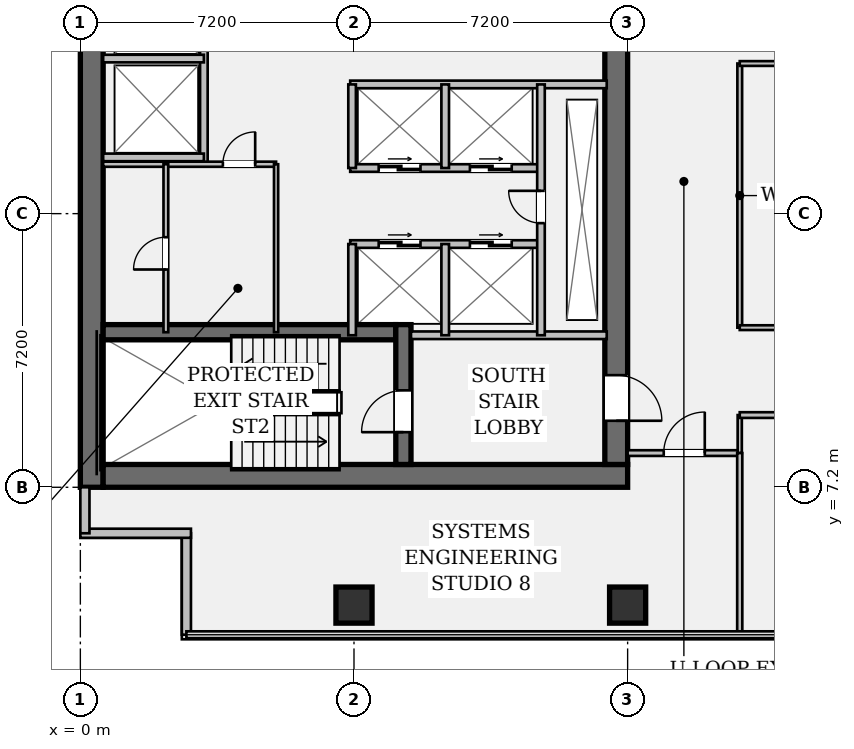
"""IFC4 building model, lengths in metres.
Left out: names, types, materials, properties, quantities, classifications, styles, units other than length and angle.
Written with IfcOpenShell. Run it as: python <this file> out.ifc"""

import sys

from ifc_helpers import new_model, si_unit, direction, frame, frame_2d, origin, origin_2d, place, context, subcontext, project, spatial, rectangle, hollow_rectangle, extrude, element, fill, save


model = new_model("IFC4")
c1 = context("Model", 3, precision=1e-05, world=origin(), true_north=direction((0.0, 1.0)))
c2 = subcontext(c1, "Body", "Model", "MODEL_VIEW")
j1 = project(units=[si_unit("LENGTHUNIT", "METRE"), si_unit("PLANEANGLEUNIT", "RADIAN")], contexts=[c1])
p1 = place(None, origin())
s1 = spatial("IfcSite", under=j1, at=p1, CompositionType="ELEMENT")
p2 = place(p1, origin())
s2 = spatial("IfcBuilding", under=s1, at=p2, CompositionType="ELEMENT")
p3 = place(p2, frame((0.0, 0.0, 102.2)))
s3 = spatial("IfcBuildingStorey", under=s2, at=p3, CompositionType="ELEMENT", Elevation=102.2)
p4 = place(p3, frame((0.3, 7.2, 0.0), z_axis=(0.0, 0.0, 1.0), x_axis=(0.0, 1.0, 0.0)))
e1 = element("IfcWall", 1, at=p4, inside=s3, PredefinedType="SHEAR", context=c2, shape_type="SweptSolid", body=[
    extrude(rectangle(XDim=28.8, YDim=0.6, at=frame_2d((14.4, 0.0))), origin(), (0.0, 0.0, 1.0), 3.58),
])
p5 = place(p3, frame((0.6, 7.5, 0.0), z_axis=(0.0, 0.0, 1.0), x_axis=(1.0, 0.0, 0.0)))
e2 = element("IfcWall", 2, at=p5, inside=s3, PredefinedType="SHEAR", context=c2, shape_type="SweptSolid", body=[
    extrude(rectangle(XDim=13.8, YDim=0.6, at=frame_2d((6.9, 0.0))), origin(), (0.0, 0.0, 1.0), 3.58),
])
p6 = place(p3, frame((14.1, 35.4, 0.0), z_axis=(0.0, 0.0, 1.0), x_axis=(0.0, -1.0, 0.0)))
e3 = element("IfcWall", 3, at=p6, inside=s3, PredefinedType="SHEAR", context=c2, shape_type="SweptSolid", body=[
    extrude(rectangle(XDim=27.6, YDim=0.6, at=frame_2d((13.8, 0.0))), origin(), (0.0, 0.0, 1.0), 3.58),
])
p7 = place(p6, frame((1.3, 0.0, 0.0)))
e4 = element("IfcOpeningElement", 4, at=p7, cuts=e3, PredefinedType="OPENING", context=c2, shape_type="SweptSolid", body=[
    extrude(rectangle(XDim=1.2, YDim=2.15, at=frame_2d((0.6, 1.075))), frame((0.0, 0.312, 0.0), z_axis=(0.0, -1.0, 0.0), x_axis=(1.0, 0.0, 0.0)), (0.0, 0.0, 1.0), 0.624),
])
p8 = place(p6, frame((25.25, 0.0, 0.0)))
e5 = element("IfcOpeningElement", 5, at=p8, cuts=e3, PredefinedType="OPENING", context=c2, shape_type="SweptSolid", body=[
    extrude(rectangle(XDim=1.2, YDim=2.15, at=frame_2d((0.6, 1.075))), frame((0.0, 0.312, 0.0), z_axis=(0.0, -1.0, 0.0), x_axis=(1.0, 0.0, 0.0)), (0.0, 0.0, 1.0), 0.624),
])
p9 = place(p6, frame((14.6, 0.0, 0.0)))
e6 = element("IfcOpeningElement", 6, at=p9, cuts=e3, PredefinedType="OPENING", context=c2, shape_type="SweptSolid", body=[
    extrude(rectangle(XDim=1.6, YDim=2.2, at=frame_2d((0.8, 1.1))), frame((0.0, 0.312, 0.0), z_axis=(0.0, -1.0, 0.0), x_axis=(1.0, 0.0, 0.0)), (0.0, 0.0, 1.0), 0.624),
])
p10 = place(p3, frame((0.6, 11.28, 0.0), z_axis=(0.0, 0.0, 1.0), x_axis=(1.0, 0.0, 0.0)))
e7 = element("IfcWall", 7, at=p10, inside=s3, PredefinedType="SHEAR", context=c2, shape_type="SweptSolid", body=[
    extrude(rectangle(XDim=7.7, YDim=0.4, at=frame_2d((3.85, 0.0))), origin(), (0.0, 0.0, 1.0), 3.58),
])
p11 = place(p3, frame((8.5, 7.8, 0.0), z_axis=(0.0, 0.0, 1.0), x_axis=(0.0, 1.0, 0.0)))
e8 = element("IfcWall", 8, at=p11, inside=s3, PredefinedType="SHEAR", context=c2, shape_type="SweptSolid", body=[
    extrude(rectangle(XDim=3.68, YDim=0.4, at=frame_2d((1.84, 0.0))), origin(), (0.0, 0.0, 1.0), 3.58),
])
p12 = place(p11, frame((0.85, 0.0, 0.0)))
e9 = element("IfcOpeningElement", 9, at=p12, cuts=e8, PredefinedType="OPENING", context=c2, shape_type="SweptSolid", body=[
    extrude(rectangle(XDim=1.1, YDim=2.15, at=frame_2d((0.55, 1.075))), frame((0.0, 0.212, 0.0), z_axis=(0.0, -1.0, 0.0), x_axis=(1.0, 0.0, 0.0)), (0.0, 0.0, 1.0), 0.424),
])
for number, where, z_axis, x_axis in (
    (10, (7.2, 4.1, 0.0), (0.0, 0.0, 1.0), (1.0, 0.0, 0.0)),
    (11, (14.4, 4.1, 0.0), (0.0, 0.0, 1.0), (1.0, 0.0, 0.0)),
):
    element("IfcColumn", number, at=place(p3, frame(where, z_axis=z_axis, x_axis=x_axis)), inside=s3, PredefinedType="COLUMN", context=c2, shape_type="SweptSolid", body=[
        extrude(hollow_rectangle(XDim=0.95, YDim=0.95, WallThickness=0.06, at=origin_2d()), origin(), (0.0, 0.0, 1.0), 3.58),
    ])
p13 = place(p3, frame((2.79, 3.32, 0.0), z_axis=(0.0, 0.0, 1.0), x_axis=(0.0, 1.0, 0.0)))
e12 = element("IfcWall", 12, at=p13, inside=s3, PredefinedType="STANDARD", context=c2, shape_type="SweptSolid", body=[
    extrude(rectangle(XDim=2.67, YDim=0.24, at=frame_2d((1.335, 0.0))), origin(), (0.0, 0.0, 1.0), 3.58),
])
p14 = place(p3, frame((2.91, 5.99, 0.0), z_axis=(0.0, 0.0, 1.0), x_axis=(-1.0, 0.0, 0.0)))
e13 = element("IfcWall", 13, at=p14, inside=s3, PredefinedType="STANDARD", context=c2, shape_type="SweptSolid", body=[
    extrude(rectangle(XDim=2.91, YDim=0.24, at=frame_2d((1.455, 0.0))), origin(), (0.0, 0.0, 1.0), 3.58),
])
p15 = place(p3, frame((0.12, 5.99, 0.0), z_axis=(0.0, 0.0, 1.0), x_axis=(0.0, 1.0, 0.0)))
e14 = element("IfcWall", 14, at=p15, inside=s3, PredefinedType="STANDARD", context=c2, shape_type="SweptSolid", body=[
    extrude(rectangle(XDim=1.21, YDim=0.24, at=frame_2d((0.605, 0.0))), origin(), (0.0, 0.0, 1.0), 3.58),
])
p16 = place(p3, frame((8.7, 11.2, 0.0), z_axis=(0.0, 0.0, 1.0), x_axis=(1.0, 0.0, 0.0)))
e15 = element("IfcWall", 15, at=p16, inside=s3, PredefinedType="PARTITIONING", context=c2, shape_type="SweptSolid", body=[
    extrude(rectangle(XDim=5.15, YDim=0.2, at=frame_2d((2.575, 0.0))), origin(), (0.0, 0.0, 1.0), 3.58),
])
p17 = place(p3, frame((3.25, 15.7, 0.0), z_axis=(0.0, 0.0, 1.0), x_axis=(0.0, 1.0, 0.0)))
e16 = element("IfcWall", 16, at=p17, inside=s3, PredefinedType="PARTITIONING", context=c2, shape_type="SweptSolid", body=[
    extrude(rectangle(XDim=13.08, YDim=0.2, at=frame_2d((6.54, 0.0))), origin(), (0.0, 0.0, 1.0), 3.58),
])
for number, where, z_axis, x_axis in (
    (17, (0.6, 15.88, 0.0), (0.0, 0.0, 1.0), (1.0, 0.0, 0.0)),
    (18, (0.6, 18.48, 0.0), (0.0, 0.0, 1.0), (1.0, 0.0, 0.0)),
):
    element("IfcWall", number, at=place(p3, frame(where, z_axis=z_axis, x_axis=x_axis)), inside=s3, PredefinedType="PARTITIONING", context=c2, shape_type="SweptSolid", body=[
        extrude(rectangle(XDim=2.65, YDim=0.2, at=frame_2d((1.325, 0.0))), origin(), (0.0, 0.0, 1.0), 3.58),
    ])
p18 = place(p3, frame((7.1, 17.8, 0.0), z_axis=(0.0, 0.0, 1.0), x_axis=(1.0, 0.0, 0.0)))
e19 = element("IfcWall", 19, at=p18, inside=s3, PredefinedType="PARTITIONING", context=c2, shape_type="SweptSolid", body=[
    extrude(rectangle(XDim=6.75, YDim=0.2, at=frame_2d((3.375, 0.0))), origin(), (0.0, 0.0, 1.0), 3.58),
])
p19 = place(p3, frame((7.1, 15.6, 0.0), z_axis=(0.0, 0.0, 1.0), x_axis=(1.0, 0.0, 0.0)))
e20 = element("IfcWall", 20, at=p19, inside=s3, PredefinedType="PARTITIONING", context=c2, shape_type="SweptSolid", body=[
    extrude(rectangle(XDim=5.02, YDim=0.2, at=frame_2d((2.51, 0.0))), origin(), (0.0, 0.0, 1.0), 3.58),
])
p20 = place(p19, frame((0.75, 0.0, 0.0)))
e21 = element("IfcOpeningElement", 21, at=p20, cuts=e20, PredefinedType="OPENING", context=c2, shape_type="SweptSolid", body=[
    extrude(rectangle(XDim=1.1, YDim=2.2, at=frame_2d((0.55, 1.1))), frame((0.0, 0.112, 0.0), z_axis=(0.0, -1.0, 0.0), x_axis=(1.0, 0.0, 0.0)), (0.0, 0.0, 1.0), 0.224),
])
p21 = place(p19, frame((3.15, 0.0, 0.0)))
e22 = element("IfcOpeningElement", 22, at=p21, cuts=e20, PredefinedType="OPENING", context=c2, shape_type="SweptSolid", body=[
    extrude(rectangle(XDim=1.1, YDim=2.2, at=frame_2d((0.55, 1.1))), frame((0.0, 0.112, 0.0), z_axis=(0.0, -1.0, 0.0), x_axis=(1.0, 0.0, 0.0)), (0.0, 0.0, 1.0), 0.224),
])
p22 = place(p3, frame((7.1, 13.6, 0.0), z_axis=(0.0, 0.0, 1.0), x_axis=(1.0, 0.0, 0.0)))
e23 = element("IfcWall", 23, at=p22, inside=s3, PredefinedType="PARTITIONING", context=c2, shape_type="SweptSolid", body=[
    extrude(rectangle(XDim=5.02, YDim=0.2, at=frame_2d((2.51, 0.0))), origin(), (0.0, 0.0, 1.0), 3.58),
])
p23 = place(p22, frame((0.75, 0.0, 0.0)))
e24 = element("IfcOpeningElement", 24, at=p23, cuts=e23, PredefinedType="OPENING", context=c2, shape_type="SweptSolid", body=[
    extrude(rectangle(XDim=1.1, YDim=2.2, at=frame_2d((0.55, 1.1))), frame((0.0, 0.112, 0.0), z_axis=(0.0, -1.0, 0.0), x_axis=(1.0, 0.0, 0.0)), (0.0, 0.0, 1.0), 0.224),
])
p24 = place(p22, frame((3.15, 0.0, 0.0)))
e25 = element("IfcOpeningElement", 25, at=p24, cuts=e23, PredefinedType="OPENING", context=c2, shape_type="SweptSolid", body=[
    extrude(rectangle(XDim=1.1, YDim=2.2, at=frame_2d((0.55, 1.1))), frame((0.0, 0.112, 0.0), z_axis=(0.0, -1.0, 0.0), x_axis=(1.0, 0.0, 0.0)), (0.0, 0.0, 1.0), 0.224),
])
p25 = place(p3, frame((7.15, 15.6, 0.0), z_axis=(0.0, 0.0, 1.0), x_axis=(0.0, 1.0, 0.0)))
e26 = element("IfcWall", 26, at=p25, inside=s3, PredefinedType="PARTITIONING", context=c2, shape_type="SweptSolid", body=[
    extrude(rectangle(XDim=2.2, YDim=0.2, at=frame_2d((1.1, 0.0))), origin(), (0.0, 0.0, 1.0), 3.58),
])
p26 = place(p3, frame((7.15, 11.2, 0.0), z_axis=(0.0, 0.0, 1.0), x_axis=(0.0, 1.0, 0.0)))
e27 = element("IfcWall", 27, at=p26, inside=s3, PredefinedType="PARTITIONING", context=c2, shape_type="SweptSolid", body=[
    extrude(rectangle(XDim=2.4, YDim=0.2, at=frame_2d((1.2, 0.0))), origin(), (0.0, 0.0, 1.0), 3.58),
])
p27 = place(p3, frame((9.6, 15.6, 0.0), z_axis=(0.0, 0.0, 1.0), x_axis=(0.0, 1.0, 0.0)))
e28 = element("IfcWall", 28, at=p27, inside=s3, PredefinedType="PARTITIONING", context=c2, shape_type="SweptSolid", body=[
    extrude(rectangle(XDim=2.2, YDim=0.2, at=frame_2d((1.1, 0.0))), origin(), (0.0, 0.0, 1.0), 3.58),
])
p28 = place(p3, frame((9.6, 11.2, 0.0), z_axis=(0.0, 0.0, 1.0), x_axis=(0.0, 1.0, 0.0)))
e29 = element("IfcWall", 29, at=p28, inside=s3, PredefinedType="PARTITIONING", context=c2, shape_type="SweptSolid", body=[
    extrude(rectangle(XDim=2.4, YDim=0.2, at=frame_2d((1.2, 0.0))), origin(), (0.0, 0.0, 1.0), 3.58),
])
p29 = place(p3, frame((12.12, 11.2, 0.0), z_axis=(0.0, 0.0, 1.0), x_axis=(0.0, 1.0, 0.0)))
e30 = element("IfcWall", 30, at=p29, inside=s3, PredefinedType="PARTITIONING", context=c2, shape_type="SweptSolid", body=[
    extrude(rectangle(XDim=6.6, YDim=0.2, at=frame_2d((3.3, 0.0))), origin(), (0.0, 0.0, 1.0), 3.58),
])
p30 = place(p29, frame((2.95, 0.0, 0.0)))
e31 = element("IfcOpeningElement", 31, at=p30, cuts=e30, PredefinedType="OPENING", context=c2, shape_type="SweptSolid", body=[
    extrude(rectangle(XDim=0.85, YDim=2.15, at=frame_2d((0.425, 1.075))), frame((0.0, 0.112, 0.0), z_axis=(0.0, -1.0, 0.0), x_axis=(1.0, 0.0, 0.0)), (0.0, 0.0, 1.0), 0.224),
])
p31 = place(p3, frame((0.6, 15.7, 0.0), z_axis=(0.0, 0.0, 1.0), x_axis=(1.0, 0.0, 0.0)))
e32 = element("IfcWall", 32, at=p31, inside=s3, PredefinedType="PARTITIONING", context=c2, shape_type="SweptSolid", body=[
    extrude(rectangle(XDim=4.55, YDim=0.135, at=frame_2d((2.275, 0.0))), origin(), (0.0, 0.0, 1.0), 3.58),
])
p32 = place(p31, frame((3.15, 0.0, 0.0)))
e33 = element("IfcOpeningElement", 33, at=p32, cuts=e32, PredefinedType="OPENING", context=c2, shape_type="SweptSolid", body=[
    extrude(rectangle(XDim=0.85, YDim=2.15, at=frame_2d((0.425, 1.075))), frame((0.0, 0.08, 0.0), z_axis=(0.0, -1.0, 0.0), x_axis=(1.0, 0.0, 0.0)), (0.0, 0.0, 1.0), 0.159),
])
p33 = place(p3, frame((5.15, 11.28, 0.0), z_axis=(0.0, 0.0, 1.0), x_axis=(0.0, 1.0, 0.0)))
e34 = element("IfcWall", 34, at=p33, inside=s3, PredefinedType="PARTITIONING", context=c2, shape_type="SweptSolid", body=[
    extrude(rectangle(XDim=4.42, YDim=0.11, at=frame_2d((2.21, 0.0))), origin(), (0.0, 0.0, 1.0), 3.58),
])
p34 = place(p3, frame((2.25, 11.28, 0.0), z_axis=(0.0, 0.0, 1.0), x_axis=(0.0, 1.0, 0.0)))
e35 = element("IfcWall", 35, at=p34, inside=s3, PredefinedType="PARTITIONING", context=c2, shape_type="SweptSolid", body=[
    extrude(rectangle(XDim=4.42, YDim=0.125, at=frame_2d((2.21, 0.0))), origin(), (0.0, 0.0, 1.0), 3.58),
])
p35 = place(p34, frame((1.65, 0.0, 0.0)))
e36 = element("IfcOpeningElement", 36, at=p35, cuts=e35, PredefinedType="OPENING", context=c2, shape_type="SweptSolid", body=[
    extrude(rectangle(XDim=0.85, YDim=2.15, at=frame_2d((0.425, 1.075))), frame((0.0, 0.074, 0.0), z_axis=(0.0, -1.0, 0.0), x_axis=(1.0, 0.0, 0.0)), (0.0, 0.0, 1.0), 0.149),
])
p36 = place(p3, frame((14.4, 8.1, 0.0), z_axis=(0.0, 0.0, 1.0), x_axis=(1.0, 0.0, 0.0)))
e37 = element("IfcWall", 37, at=p36, inside=s3, PredefinedType="PARTITIONING", context=c2, shape_type="SweptSolid", body=[
    extrude(rectangle(XDim=2.95, YDim=0.15, at=frame_2d((1.475, 0.0))), origin(), (0.0, 0.0, 1.0), 3.098),
])
p37 = place(p36, frame((0.95, 0.0, 0.0)))
e38 = element("IfcOpeningElement", 38, at=p37, cuts=e37, PredefinedType="OPENING", context=c2, shape_type="SweptSolid", body=[
    extrude(rectangle(XDim=1.08, YDim=2.15, at=frame_2d((0.54, 1.075))), frame((0.0, 0.087, 0.0), z_axis=(0.0, -1.0, 0.0), x_axis=(1.0, 0.0, 0.0)), (0.0, 0.0, 1.0), 0.174),
])
p38 = place(p3, frame((17.35, 8.1, 0.0), z_axis=(0.0, 0.0, 1.0), x_axis=(0.0, 1.0, 0.0)))
e39 = element("IfcWall", 39, at=p38, inside=s3, PredefinedType="PARTITIONING", context=c2, shape_type="SweptSolid", body=[
    extrude(rectangle(XDim=1.0, YDim=0.11, at=frame_2d((0.5, 0.0))), origin(), (0.0, 0.0, 1.0), 3.58),
])
p39 = place(p3, frame((17.35, 9.1, 0.0), z_axis=(0.0, 0.0, 1.0), x_axis=(1.0, 0.0, 0.0)))
e40 = element("IfcWall", 40, at=p39, inside=s3, PredefinedType="PARTITIONING", context=c2, shape_type="SweptSolid", body=[
    extrude(rectangle(XDim=22.35, YDim=0.15, at=frame_2d((11.175, 0.0))), origin(), (0.0, 0.0, 1.0), 2.793),
])
p40 = place(p39, frame((4.02, 0.0, 0.0)))
e41 = element("IfcOpeningElement", 41, at=p40, cuts=e40, PredefinedType="OPENING", context=c2, shape_type="SweptSolid", body=[
    extrude(rectangle(XDim=1.08, YDim=2.15, at=frame_2d((0.54, 1.075))), frame((0.0, 0.087, 0.0), z_axis=(0.0, -1.0, 0.0), x_axis=(1.0, 0.0, 0.0)), (0.0, 0.0, 1.0), 0.174),
])
p41 = place(p39, frame((15.2, 0.0, 0.0)))
e42 = element("IfcOpeningElement", 42, at=p41, cuts=e40, PredefinedType="OPENING", context=c2, shape_type="SweptSolid", body=[
    extrude(rectangle(XDim=1.08, YDim=2.15, at=frame_2d((0.54, 1.075))), frame((0.0, 0.087, 0.0), z_axis=(0.0, -1.0, 0.0), x_axis=(1.0, 0.0, 0.0)), (0.0, 0.0, 1.0), 0.174),
])
p42 = place(p3, frame((17.35, 11.4, 0.0), z_axis=(0.0, 0.0, 1.0), x_axis=(0.0, 1.0, 0.0)))
e43 = element("IfcWall", 43, at=p42, inside=s3, PredefinedType="PARTITIONING", context=c2, shape_type="SweptSolid", body=[
    extrude(rectangle(XDim=6.95, YDim=0.125, at=frame_2d((3.475, 0.0))), origin(), (0.0, 0.0, 1.0), 2.793),
])
p43 = place(p3, frame((17.35, 11.4, 0.0), z_axis=(0.0, 0.0, 1.0), x_axis=(1.0, 0.0, 0.0)))
e44 = element("IfcWall", 44, at=p43, inside=s3, PredefinedType="PARTITIONING", context=c2, shape_type="SweptSolid", body=[
    extrude(rectangle(XDim=20.0, YDim=0.125, at=frame_2d((10.0, 0.0))), origin(), (0.0, 0.0, 1.0), 2.793),
])
p44 = place(p3, frame((17.35, 18.35, 0.0), z_axis=(0.0, 0.0, 1.0), x_axis=(1.0, 0.0, 0.0)))
e45 = element("IfcWall", 45, at=p44, inside=s3, PredefinedType="PARTITIONING", context=c2, shape_type="SweptSolid", body=[
    extrude(rectangle(XDim=20.0, YDim=0.125, at=frame_2d((10.0, 0.0))), origin(), (0.0, 0.0, 1.0), 2.793),
])
p45 = place(p44, frame((5.23, 0.0, 0.0)))
e46 = element("IfcOpeningElement", 46, at=p45, cuts=e45, PredefinedType="OPENING", context=c2, shape_type="SweptSolid", body=[
    extrude(rectangle(XDim=1.08, YDim=2.15, at=frame_2d((0.54, 1.075))), frame((0.0, 0.074, 0.0), z_axis=(0.0, -1.0, 0.0), x_axis=(1.0, 0.0, 0.0)), (0.0, 0.0, 1.0), 0.149),
])
p46 = place(p44, frame((15.23, 0.0, 0.0)))
e47 = element("IfcOpeningElement", 47, at=p46, cuts=e45, PredefinedType="OPENING", context=c2, shape_type="SweptSolid", body=[
    extrude(rectangle(XDim=1.08, YDim=2.15, at=frame_2d((0.54, 1.075))), frame((0.0, 0.074, 0.0), z_axis=(0.0, -1.0, 0.0), x_axis=(1.0, 0.0, 0.0)), (0.0, 0.0, 1.0), 0.149),
])
p47 = place(p3, frame((17.35, 3.32, 0.0), z_axis=(0.0, 0.0, 1.0), x_axis=(0.0, 1.0, 0.0)))
e48 = element("IfcWall", 48, at=p47, inside=s3, PredefinedType="PARTITIONING", context=c2, shape_type="SweptSolid", body=[
    extrude(rectangle(XDim=4.78, YDim=0.135, at=frame_2d((2.39, 0.0))), origin(), (0.0, 0.0, 1.0), 2.793),
])
p48 = place(p12, origin())
e49 = element("IfcDoor", 49, at=p48, inside=s3, OperationType="SINGLE_SWING_LEFT", PredefinedType="DOOR", context=c2, shape_type="SweptSolid", body=[
    extrude(rectangle(XDim=1.1, YDim=2.15, at=frame_2d((0.55, 1.075))), frame((0.0, 0.025, 0.0), z_axis=(0.0, -1.0, 0.0), x_axis=(1.0, 0.0, 0.0)), (0.0, 0.0, 1.0), 0.05),
])
fill(e9, e49)
p49 = place(p8, origin())
e50 = element("IfcDoor", 50, at=p49, inside=s3, OperationType="SINGLE_SWING_RIGHT", PredefinedType="DOOR", context=c2, shape_type="SweptSolid", body=[
    extrude(rectangle(XDim=1.2, YDim=2.15, at=frame_2d((0.6, 1.075))), frame((0.0, 0.025, 0.0), z_axis=(0.0, -1.0, 0.0), x_axis=(1.0, 0.0, 0.0)), (0.0, 0.0, 1.0), 0.05),
])
fill(e5, e50)
p50 = place(p30, origin())
e51 = element("IfcDoor", 51, at=p50, inside=s3, OperationType="SINGLE_SWING_RIGHT", PredefinedType="DOOR", context=c2, shape_type="SweptSolid", body=[
    extrude(rectangle(XDim=0.85, YDim=2.15, at=frame_2d((0.425, 1.075))), frame((0.0, 0.025, 0.0), z_axis=(0.0, -1.0, 0.0), x_axis=(1.0, 0.0, 0.0)), (0.0, 0.0, 1.0), 0.05),
])
fill(e31, e51)
p51 = place(p20, origin())
e52 = element("IfcDoor", 52, at=p51, inside=s3, OperationType="DOUBLE_DOOR_SLIDING", PredefinedType="DOOR", context=c2, shape_type="SweptSolid", body=[
    extrude(rectangle(XDim=1.1, YDim=2.2, at=frame_2d((0.55, 1.1))), frame((0.0, 0.025, 0.0), z_axis=(0.0, -1.0, 0.0), x_axis=(1.0, 0.0, 0.0)), (0.0, 0.0, 1.0), 0.05),
])
fill(e21, e52)
p52 = place(p21, origin())
e53 = element("IfcDoor", 53, at=p52, inside=s3, OperationType="DOUBLE_DOOR_SLIDING", PredefinedType="DOOR", context=c2, shape_type="SweptSolid", body=[
    extrude(rectangle(XDim=1.1, YDim=2.2, at=frame_2d((0.55, 1.1))), frame((0.0, 0.025, 0.0), z_axis=(0.0, -1.0, 0.0), x_axis=(1.0, 0.0, 0.0)), (0.0, 0.0, 1.0), 0.05),
])
fill(e22, e53)
p53 = place(p23, origin())
e54 = element("IfcDoor", 54, at=p53, inside=s3, OperationType="DOUBLE_DOOR_SLIDING", PredefinedType="DOOR", context=c2, shape_type="SweptSolid", body=[
    extrude(rectangle(XDim=1.1, YDim=2.2, at=frame_2d((0.55, 1.1))), frame((0.0, 0.025, 0.0), z_axis=(0.0, -1.0, 0.0), x_axis=(1.0, 0.0, 0.0)), (0.0, 0.0, 1.0), 0.05),
])
fill(e24, e54)
p54 = place(p24, origin())
e55 = element("IfcDoor", 55, at=p54, inside=s3, OperationType="DOUBLE_DOOR_SLIDING", PredefinedType="DOOR", context=c2, shape_type="SweptSolid", body=[
    extrude(rectangle(XDim=1.1, YDim=2.2, at=frame_2d((0.55, 1.1))), frame((0.0, 0.025, 0.0), z_axis=(0.0, -1.0, 0.0), x_axis=(1.0, 0.0, 0.0)), (0.0, 0.0, 1.0), 0.05),
])
fill(e25, e55)
p55 = place(p32, origin())
e56 = element("IfcDoor", 56, at=p55, inside=s3, OperationType="SINGLE_SWING_RIGHT", PredefinedType="DOOR", context=c2, shape_type="SweptSolid", body=[
    extrude(rectangle(XDim=0.85, YDim=2.15, at=frame_2d((0.425, 1.075))), frame((0.0, 0.025, 0.0), z_axis=(0.0, -1.0, 0.0), x_axis=(1.0, 0.0, 0.0)), (0.0, 0.0, 1.0), 0.05),
])
fill(e33, e56)
p56 = place(p35, origin())
e57 = element("IfcDoor", 57, at=p56, inside=s3, OperationType="SINGLE_SWING_LEFT", PredefinedType="DOOR", context=c2, shape_type="SweptSolid", body=[
    extrude(rectangle(XDim=0.85, YDim=2.15, at=frame_2d((0.425, 1.075))), frame((0.0, 0.025, 0.0), z_axis=(0.0, -1.0, 0.0), x_axis=(1.0, 0.0, 0.0)), (0.0, 0.0, 1.0), 0.05),
])
fill(e36, e57)
p57 = place(p37, origin())
e58 = element("IfcDoor", 58, at=p57, inside=s3, OperationType="SINGLE_SWING_RIGHT", PredefinedType="DOOR", context=c2, shape_type="SweptSolid", body=[
    extrude(rectangle(XDim=1.08, YDim=2.15, at=frame_2d((0.54, 1.075))), frame((0.0, 0.025, 0.0), z_axis=(0.0, -1.0, 0.0), x_axis=(1.0, 0.0, 0.0)), (0.0, 0.0, 1.0), 0.05),
])
fill(e38, e58)
save(model, sys.argv[1])
